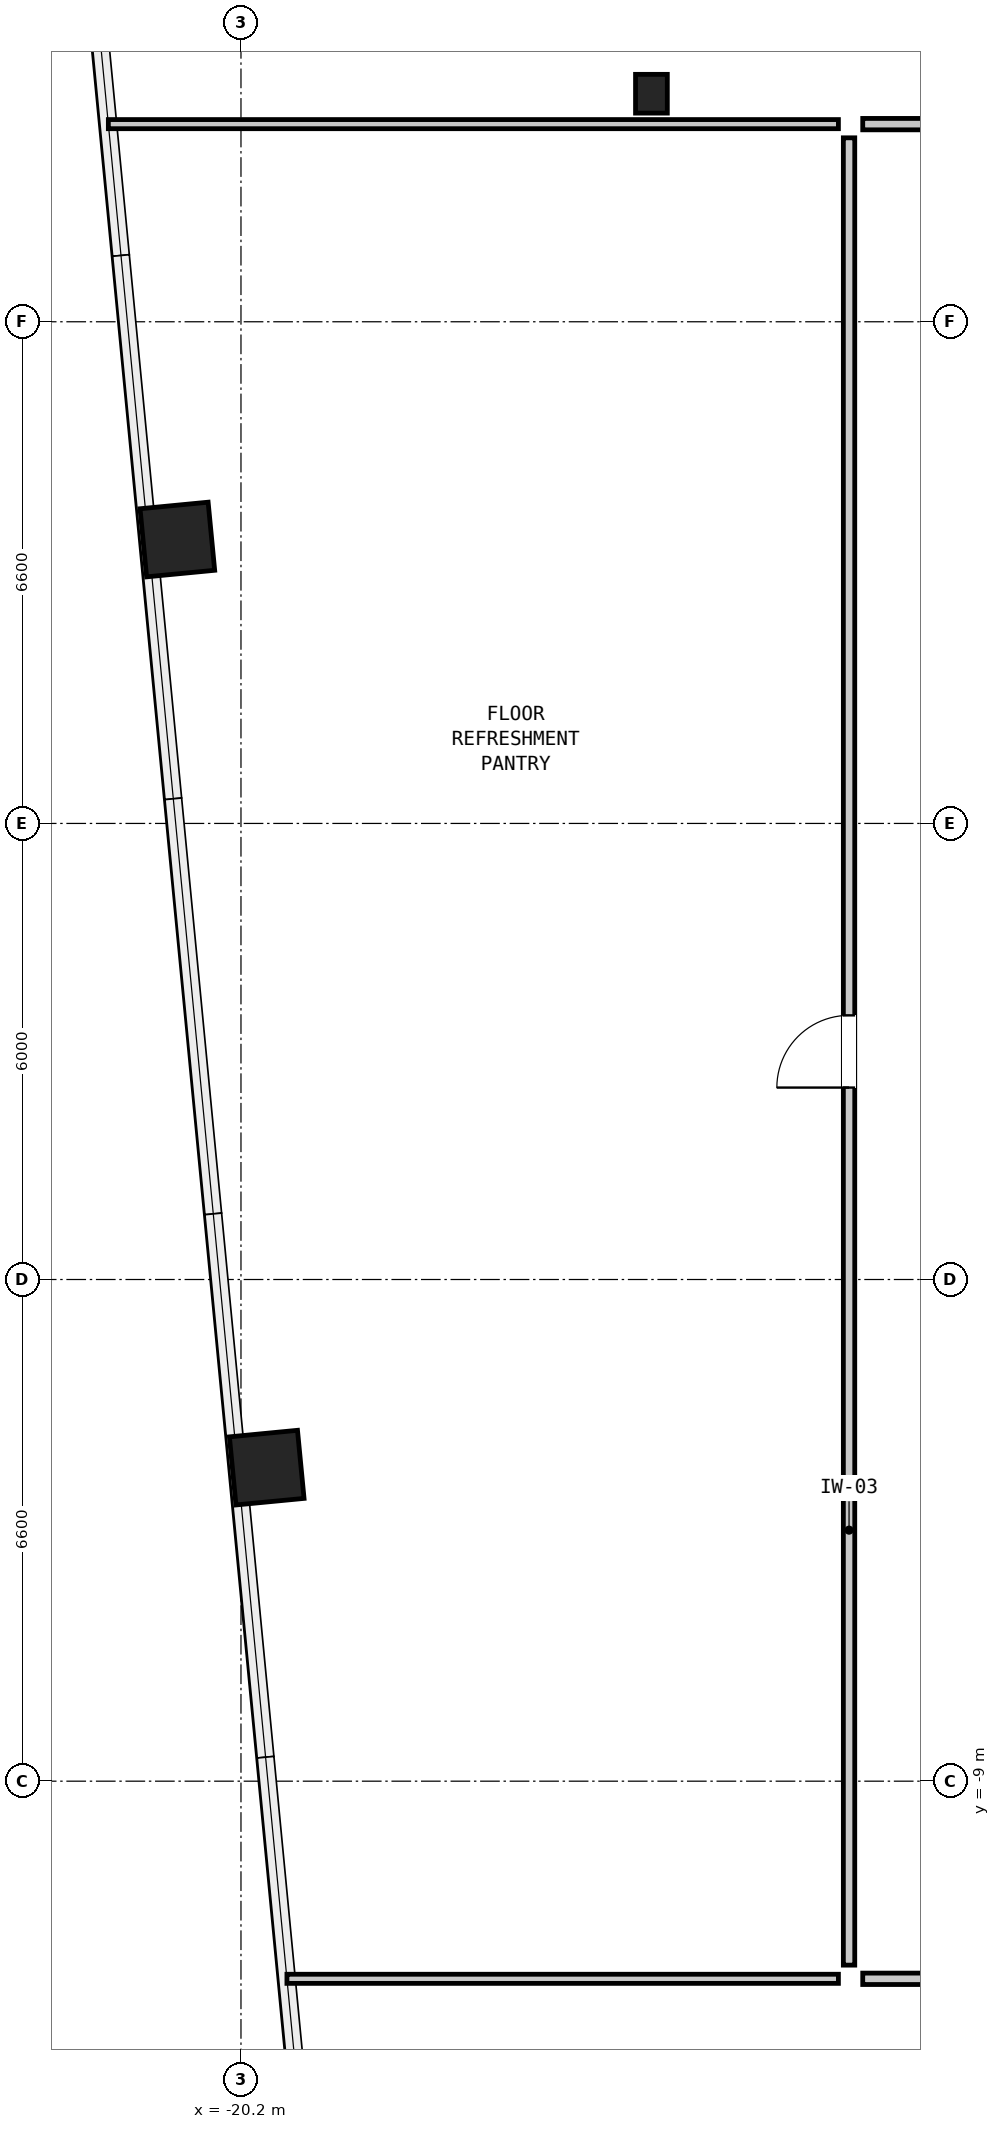
"""IFC4 building model, lengths in metres.
Left out: names, types, materials, properties, quantities, classifications, styles, units other than length and angle.
Written with IfcOpenShell. Run it as: python <this file> out.ifc"""

import sys

from ifc_helpers import new_model, si_unit, direction, frame, frame_2d, origin, origin_2d, place, context, subcontext, project, spatial, rectangle, hollow_rectangle, i_section, extrude, element, fill, save


model = new_model("IFC4")
c1 = context("Model", 3, precision=1e-05, world=origin(), true_north=direction((0.0, 1.0)))
c2 = subcontext(c1, "Body", "Model", "MODEL_VIEW")
j1 = project(units=[si_unit("LENGTHUNIT", "METRE"), si_unit("PLANEANGLEUNIT", "RADIAN")], contexts=[c1])
p1 = place(None, origin())
s1 = spatial("IfcSite", under=j1, at=p1, CompositionType="ELEMENT")
p2 = place(p1, origin())
s2 = spatial("IfcBuilding", under=s1, at=p2, CompositionType="ELEMENT")
p3 = place(p2, frame((0.0, 0.0, 72.5)))
s3 = spatial("IfcBuildingStorey", under=s2, at=p3, CompositionType="ELEMENT", Elevation=72.5)
for number, where, z_axis, x_axis in (
    (1, (-21.037, 7.335, 0.0), (0.0, 0.0, 1.0), (-0.096, 0.995, 0.0)),
    (2, (-19.861, -4.875, 0.0), (0.0, 0.0, 1.0), (-0.096, 0.995, 0.0)),
):
    element("IfcColumn", number, at=place(p3, frame(where, z_axis=z_axis, x_axis=x_axis)), inside=s3, PredefinedType="COLUMN", context=c2, shape_type="SweptSolid", body=[
        extrude(hollow_rectangle(XDim=0.9, YDim=0.9, WallThickness=0.055, at=origin_2d()), origin(), (0.0, 0.0, 1.0), 3.05),
    ])
p4 = place(p3, frame((-14.8, 13.2, 0.0), z_axis=(0.0, 0.0, 1.0), x_axis=(1.0, 0.0, 0.0)))
e3 = element("IfcColumn", 3, at=p4, inside=s3, PredefinedType="COLUMN", context=c2, shape_type="SweptSolid", body=[
    extrude(i_section(OverallWidth=0.418, OverallDepth=0.51, WebThickness=0.042, FlangeThickness=0.068, at=origin_2d()), origin(), (0.0, 0.0, 1.0), 3.05),
])
p5 = place(p3, frame((-21.945, 12.8, 0.0), z_axis=(0.0, 0.0, 1.0), x_axis=(1.0, 0.0, 0.0)))
e4 = element("IfcWall", 4, at=p5, inside=s3, PredefinedType="PARTITIONING", context=c2, shape_type="SweptSolid", body=[
    extrude(rectangle(XDim=9.605, YDim=0.12, at=frame_2d((4.802, 0.0))), origin(), (0.0, 0.0, 1.0), 2.83),
])
p6 = place(p3, frame((-19.595, -11.6, 0.0), z_axis=(0.0, 0.0, 1.0), x_axis=(1.0, 0.0, 0.0)))
e5 = element("IfcWall", 5, at=p6, inside=s3, PredefinedType="PARTITIONING", context=c2, shape_type="SweptSolid", body=[
    extrude(rectangle(XDim=7.255, YDim=0.12, at=frame_2d((3.628, 0.0))), origin(), (0.0, 0.0, 1.0), 2.274),
])
p7 = place(p3, frame((-12.02, 12.8, 0.0), z_axis=(0.0, 0.0, 1.0), x_axis=(1.0, 0.0, 0.0)))
e6 = element("IfcWall", 6, at=p7, inside=s3, PredefinedType="PARTITIONING", context=c2, shape_type="SweptSolid", body=[
    extrude(rectangle(XDim=8.94, YDim=0.15, at=frame_2d((4.47, 0.0))), origin(), (0.0, 0.0, 1.0), 2.83),
])
p8 = place(p7, frame((3.995, 0.0, 0.0)))
e7 = element("IfcOpeningElement", 7, at=p8, cuts=e6, PredefinedType="OPENING", context=c2, shape_type="SweptSolid", body=[
    extrude(rectangle(XDim=0.95, YDim=2.1, at=frame_2d((0.475, 1.05))), frame((0.0, 0.087, 0.0), z_axis=(0.0, -1.0, 0.0), x_axis=(1.0, 0.0, 0.0)), (0.0, 0.0, 1.0), 0.174),
])
p9 = place(p3, frame((-12.02, -11.6, 0.0), z_axis=(0.0, 0.0, 1.0), x_axis=(1.0, 0.0, 0.0)))
e8 = element("IfcWall", 8, at=p9, inside=s3, PredefinedType="PARTITIONING", context=c2, shape_type="SweptSolid", body=[
    extrude(rectangle(XDim=24.04, YDim=0.15, at=frame_2d((12.02, 0.0))), origin(), (0.0, 0.0, 1.0), 2.274),
])
p10 = place(p9, frame((11.545, 0.0, 0.0)))
e9 = element("IfcOpeningElement", 9, at=p10, cuts=e8, PredefinedType="OPENING", context=c2, shape_type="SweptSolid", body=[
    extrude(rectangle(XDim=0.95, YDim=2.1, at=frame_2d((0.475, 1.05))), frame((0.0, 0.087, 0.0), z_axis=(0.0, -1.0, 0.0), x_axis=(1.0, 0.0, 0.0)), (0.0, 0.0, 1.0), 0.174),
])
p11 = place(p3, frame((-12.2, -11.42, 0.0), z_axis=(0.0, 0.0, 1.0), x_axis=(0.0, 1.0, 0.0)))
e10 = element("IfcWall", 10, at=p11, inside=s3, PredefinedType="PARTITIONING", context=c2, shape_type="SweptSolid", body=[
    extrude(rectangle(XDim=24.04, YDim=0.15, at=frame_2d((12.02, 0.0))), origin(), (0.0, 0.0, 1.0), 2.83),
])
p12 = place(p11, frame((11.545, 0.0, 0.0)))
e11 = element("IfcOpeningElement", 11, at=p12, cuts=e10, PredefinedType="OPENING", context=c2, shape_type="SweptSolid", body=[
    extrude(rectangle(XDim=0.95, YDim=2.1, at=frame_2d((0.475, 1.05))), frame((0.0, 0.087, 0.0), z_axis=(0.0, -1.0, 0.0), x_axis=(1.0, 0.0, 0.0)), (0.0, 0.0, 1.0), 0.174),
])
p13 = place(p12, origin())
e12 = element("IfcDoor", 12, at=p13, inside=s3, OperationType="SINGLE_SWING_LEFT", PredefinedType="DOOR", context=c2, shape_type="SweptSolid", body=[
    extrude(rectangle(XDim=0.95, YDim=2.1, at=frame_2d((0.475, 1.05))), frame((0.0, 0.025, 0.0), z_axis=(0.0, -1.0, 0.0), x_axis=(1.0, 0.0, 0.0)), (0.0, 0.0, 1.0), 0.05),
])
fill(e11, e12)
save(model, sys.argv[1])
